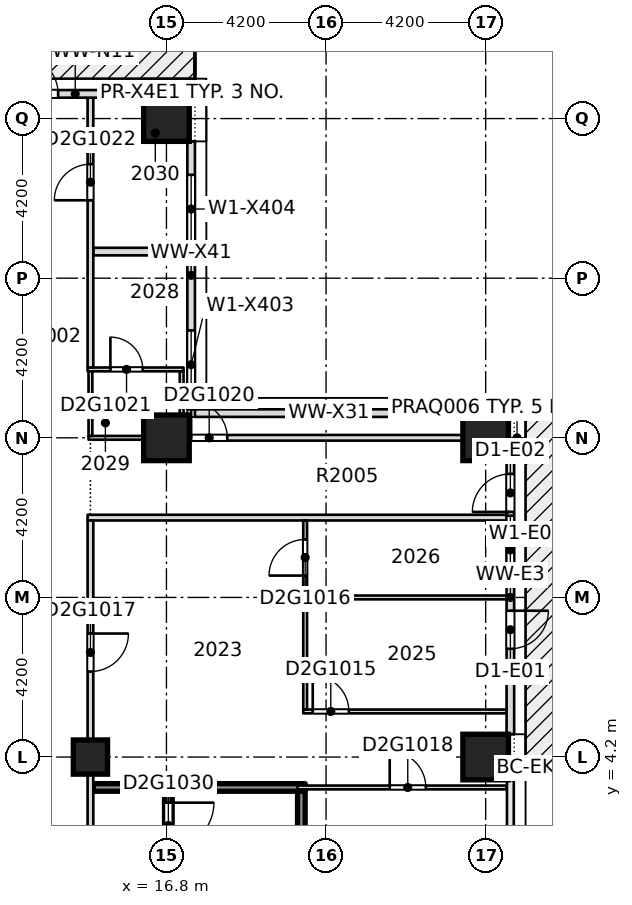
"""IFC4 building model, lengths in metres.
Left out: names, types, materials, properties, quantities, classifications, styles, units other than length and angle.
Written with IfcOpenShell. Run it as: python <this file> out.ifc"""

import sys

from ifc_helpers import new_model, si_unit, direction, frame, frame_2d, origin, origin_2d, place, context, subcontext, project, spatial, rectangle, extrude, element, fill, save


model = new_model("IFC4")
c1 = context("Model", 3, precision=1e-05, world=origin(), true_north=direction((0.0, 1.0)))
c2 = subcontext(c1, "Body", "Model", "MODEL_VIEW")
j1 = project(units=[si_unit("LENGTHUNIT", "METRE"), si_unit("PLANEANGLEUNIT", "RADIAN")], contexts=[c1])
p1 = place(None, origin())
s1 = spatial("IfcSite", under=j1, at=p1, CompositionType="ELEMENT")
p2 = place(p1, origin())
s2 = spatial("IfcBuilding", under=s1, at=p2, CompositionType="ELEMENT")
p3 = place(p2, frame((0.0, 0.0, 83.85)))
s3 = spatial("IfcBuildingStorey", under=s2, at=p3, CompositionType="ELEMENT", Elevation=83.85)
for number, where, z_axis, x_axis in (
    (1, (25.2, 4.2, -0.32), (0.0, 0.0, 1.0), (1.0, 0.0, 0.0)),
    (2, (16.8, 12.6, -0.32), (0.0, 0.0, 1.0), (1.0, 0.0, 0.0)),
    (3, (25.2, 12.6, -0.32), (0.0, 0.0, 1.0), (1.0, 0.0, 0.0)),
    (4, (16.8, 21.0, -0.32), (0.0, 0.0, 1.0), (1.0, 0.0, 0.0)),
):
    element("IfcColumn", number, at=place(p3, frame(where, z_axis=z_axis, x_axis=x_axis)), inside=s3, PredefinedType="COLUMN", context=c2, shape_type="SweptSolid", body=[
        extrude(rectangle(XDim=1.2, YDim=1.2, at=origin_2d()), origin(), (0.0, 0.0, 1.0), 3.45),
    ])
p4 = place(p3, frame((14.8, 4.2, -0.32), z_axis=(0.0, 0.0, 1.0), x_axis=(1.0, 0.0, 0.0)))
e5 = element("IfcColumn", 5, at=p4, inside=s3, PredefinedType="COLUMN", context=c2, shape_type="SweptSolid", body=[
    extrude(rectangle(XDim=0.9, YDim=0.9, at=origin_2d()), origin(), (0.0, 0.0, 1.0), 3.45),
])
p5 = place(p3, frame((14.875, 3.4, 0.0), z_axis=(0.0, 0.0, 1.0), x_axis=(1.0, 0.0, 0.0)))
e6 = element("IfcWall", 6, at=p5, inside=s3, PredefinedType="SOLIDWALL", context=c2, shape_type="SweptSolid", body=[
    extrude(rectangle(XDim=5.575, YDim=0.2, at=frame_2d((2.788, 0.0))), origin(), (0.0, 0.0, 1.0), 3.13),
])
p6 = place(p3, frame((20.25, 3.4, 0.0), z_axis=(0.0, 0.0, 1.0), x_axis=(1.0, 0.0, 0.0)))
e7 = element("IfcWall", 7, at=p6, inside=s3, PredefinedType="PARTITIONING", context=c2, shape_type="SweptSolid", body=[
    extrude(rectangle(XDim=5.5, YDim=0.1, at=frame_2d((2.75, 0.0))), origin(), (0.0, 0.0, 1.0), 3.13),
])
p7 = place(p6, frame((2.425, 0.0, 0.0)))
e8 = element("IfcOpeningElement", 8, at=p7, cuts=e7, PredefinedType="OPENING", context=c2, shape_type="SweptSolid", body=[
    extrude(rectangle(XDim=0.95, YDim=2.1, at=frame_2d((0.475, 1.05))), frame((0.0, 0.06, 0.0), z_axis=(0.0, -1.0, 0.0), x_axis=(1.0, 0.0, 0.0)), (0.0, 0.0, 1.0), 0.12),
])
p8 = place(p3, frame((20.4, 5.4, 0.0), z_axis=(0.0, 0.0, 1.0), x_axis=(1.0, 0.0, 0.0)))
e9 = element("IfcWall", 9, at=p8, inside=s3, PredefinedType="PARTITIONING", context=c2, shape_type="SweptSolid", body=[
    extrude(rectangle(XDim=5.35, YDim=0.1, at=frame_2d((2.675, 0.0))), origin(), (0.0, 0.0, 1.0), 3.13),
])
p9 = place(p8, frame((0.25, 0.0, 0.0)))
e10 = element("IfcOpeningElement", 10, at=p9, cuts=e9, PredefinedType="OPENING", context=c2, shape_type="SweptSolid", body=[
    extrude(rectangle(XDim=0.95, YDim=2.1, at=frame_2d((0.475, 1.05))), frame((0.0, 0.06, 0.0), z_axis=(0.0, -1.0, 0.0), x_axis=(1.0, 0.0, 0.0)), (0.0, 0.0, 1.0), 0.12),
])
p10 = place(p3, frame((20.5, 8.4, 0.0), z_axis=(0.0, 0.0, 1.0), x_axis=(1.0, 0.0, 0.0)))
e11 = element("IfcWall", 11, at=p10, inside=s3, PredefinedType="PARTITIONING", context=c2, shape_type="SweptSolid", body=[
    extrude(rectangle(XDim=5.25, YDim=0.1, at=frame_2d((2.625, 0.0))), origin(), (0.0, 0.0, 1.0), 3.13),
])
p11 = place(p3, frame((14.725, 10.5, 0.0), z_axis=(0.0, 0.0, 1.0), x_axis=(1.0, 0.0, 0.0)))
e12 = element("IfcWall", 12, at=p11, inside=s3, PredefinedType="PARTITIONING", context=c2, shape_type="SweptSolid", body=[
    extrude(rectangle(XDim=11.025, YDim=0.15, at=frame_2d((5.512, 0.0))), origin(), (0.0, 0.0, 1.0), 3.13),
])
p12 = place(p3, frame((14.75, 12.6, 0.0), z_axis=(0.0, 0.0, 1.0), x_axis=(1.0, 0.0, 0.0)))
e13 = element("IfcWall", 13, at=p12, inside=s3, PredefinedType="PARTITIONING", context=c2, shape_type="SweptSolid", body=[
    extrude(rectangle(XDim=2.5, YDim=0.1, at=frame_2d((1.25, 0.0))), origin(), (0.0, 0.0, 1.0), 3.13),
])
p13 = place(p3, frame((17.15, 12.6, 0.0), z_axis=(0.0, 0.0, 1.0), x_axis=(1.0, 0.0, 0.0)))
e14 = element("IfcWall", 14, at=p13, inside=s3, PredefinedType="PARTITIONING", context=c2, shape_type="SweptSolid", body=[
    extrude(rectangle(XDim=0.25, YDim=0.15, at=frame_2d((0.125, 0.0))), origin(), (0.0, 0.0, 1.0), 3.13),
])
p14 = place(p3, frame((14.725, 14.4, 0.0), z_axis=(0.0, 0.0, 1.0), x_axis=(1.0, 0.0, 0.0)))
e15 = element("IfcWall", 15, at=p14, inside=s3, PredefinedType="PARTITIONING", context=c2, shape_type="SweptSolid", body=[
    extrude(rectangle(XDim=2.525, YDim=0.1, at=frame_2d((1.262, 0.0))), origin(), (0.0, 0.0, 1.0), 3.13),
])
p15 = place(p14, frame((0.6, 0.0, 0.0)))
e16 = element("IfcOpeningElement", 16, at=p15, cuts=e15, PredefinedType="OPENING", context=c2, shape_type="SweptSolid", body=[
    extrude(rectangle(XDim=0.85, YDim=2.1, at=frame_2d((0.425, 1.05))), frame((0.0, 0.06, 0.0), z_axis=(0.0, -1.0, 0.0), x_axis=(1.0, 0.0, 0.0)), (0.0, 0.0, 1.0), 0.12),
])
p16 = place(p3, frame((14.875, 17.5, 0.0), z_axis=(0.0, 0.0, 1.0), x_axis=(1.0, 0.0, 0.0)))
e17 = element("IfcWall", 17, at=p16, inside=s3, PredefinedType="PARTITIONING", context=c2, shape_type="SweptSolid", body=[
    extrude(rectangle(XDim=2.475, YDim=0.2, at=frame_2d((1.238, 0.0))), origin(), (0.0, 0.0, 1.0), 3.13),
])
p17 = place(p3, frame((14.8, -10.45, 0.0), z_axis=(0.0, 0.0, 1.0), x_axis=(0.0, 1.0, 0.0)))
e18 = element("IfcWall", 18, at=p17, inside=s3, PredefinedType="PARTITIONING", context=c2, shape_type="SweptSolid", body=[
    extrude(rectangle(XDim=20.875, YDim=0.15, at=frame_2d((10.438, 0.0))), origin(), (0.0, 0.0, 1.0), 3.13),
])
p18 = place(p17, frame((0.9, 0.0, 0.0)))
e19 = element("IfcOpeningElement", 19, at=p18, cuts=e18, PredefinedType="OPENING", context=c2, shape_type="SweptSolid", body=[
    extrude(rectangle(XDim=0.95, YDim=2.1, at=frame_2d((0.475, 1.05))), frame((0.0, 0.085, 0.0), z_axis=(0.0, -1.0, 0.0), x_axis=(1.0, 0.0, 0.0)), (0.0, 0.0, 1.0), 0.17),
])
p19 = place(p17, frame((16.9, 0.0, 0.0)))
e20 = element("IfcOpeningElement", 20, at=p19, cuts=e18, PredefinedType="OPENING", context=c2, shape_type="SweptSolid", body=[
    extrude(rectangle(XDim=1.0, YDim=2.1, at=frame_2d((0.5, 1.05))), frame((0.0, 0.085, 0.0), z_axis=(0.0, -1.0, 0.0), x_axis=(1.0, 0.0, 0.0)), (0.0, 0.0, 1.0), 0.17),
])
p20 = place(p17, frame((9.9, 0.0, 0.0)))
e21 = element("IfcOpeningElement", 21, at=p20, cuts=e18, PredefinedType="OPENING", context=c2, shape_type="SweptSolid", body=[
    extrude(rectangle(XDim=1.1, YDim=2.1, at=frame_2d((0.55, 1.05))), frame((0.0, 0.085, 0.0), z_axis=(0.0, -1.0, 0.0), x_axis=(1.0, 0.0, 0.0)), (0.0, 0.0, 1.0), 0.17),
])
p21 = place(p17, frame((4.7, 0.0, 0.0)))
e22 = element("IfcOpeningElement", 22, at=p21, cuts=e18, PredefinedType="OPENING", context=c2, shape_type="SweptSolid", body=[
    extrude(rectangle(XDim=1.0, YDim=2.1, at=frame_2d((0.5, 1.05))), frame((0.0, 0.085, 0.0), z_axis=(0.0, -1.0, 0.0), x_axis=(1.0, 0.0, 0.0)), (0.0, 0.0, 1.0), 0.17),
])
p22 = place(p3, frame((14.8, 12.65, 0.0), z_axis=(0.0, 0.0, 1.0), x_axis=(0.0, 1.0, 0.0)))
e23 = element("IfcWall", 23, at=p22, inside=s3, PredefinedType="PARTITIONING", context=c2, shape_type="SweptSolid", body=[
    extrude(rectangle(XDim=1.7, YDim=0.1, at=frame_2d((0.85, 0.0))), origin(), (0.0, 0.0, 1.0), 3.13),
])
p23 = place(p3, frame((14.8, 14.45, 0.0), z_axis=(0.0, 0.0, 1.0), x_axis=(0.0, 1.0, 0.0)))
e24 = element("IfcWall", 24, at=p23, inside=s3, PredefinedType="PARTITIONING", context=c2, shape_type="SweptSolid", body=[
    extrude(rectangle(XDim=7.1, YDim=0.15, at=frame_2d((3.55, 0.0))), origin(), (0.0, 0.0, 1.0), 3.13),
])
p24 = place(p23, frame((4.4, 0.0, 0.0)))
e25 = element("IfcOpeningElement", 25, at=p24, cuts=e24, PredefinedType="OPENING", context=c2, shape_type="SweptSolid", body=[
    extrude(rectangle(XDim=0.95, YDim=2.1, at=frame_2d((0.475, 1.05))), frame((0.0, 0.085, 0.0), z_axis=(0.0, -1.0, 0.0), x_axis=(1.0, 0.0, 0.0)), (0.0, 0.0, 1.0), 0.17),
])
p25 = place(p3, frame((16.85, -3.3, 0.0), z_axis=(0.0, 0.0, 1.0), x_axis=(0.0, 1.0, 0.0)))
e26 = element("IfcWall", 26, at=p25, inside=s3, PredefinedType="SOLIDWALL", context=c2, shape_type="SweptSolid", body=[
    extrude(rectangle(XDim=6.6, YDim=0.2, at=frame_2d((3.3, 0.0))), origin(), (0.0, 0.0, 1.0), 3.13),
])
p26 = place(p25, frame((5.1, 0.0, 0.0)))
e27 = element("IfcOpeningElement", 27, at=p26, cuts=e26, PredefinedType="OPENING", context=c2, shape_type="SweptSolid", body=[
    extrude(rectangle(XDim=1.2, YDim=2.1, at=frame_2d((0.6, 1.05))), frame((0.0, 0.11, 0.0), z_axis=(0.0, -1.0, 0.0), x_axis=(1.0, 0.0, 0.0)), (0.0, 0.0, 1.0), 0.22),
])
p27 = place(p3, frame((17.2, 12.675, 0.0), z_axis=(0.0, 0.0, 1.0), x_axis=(0.0, 1.0, 0.0)))
e28 = element("IfcWall", 28, at=p27, inside=s3, PredefinedType="PARTITIONING", context=c2, shape_type="SweptSolid", body=[
    extrude(rectangle(XDim=1.675, YDim=0.1, at=frame_2d((0.837, 0.0))), origin(), (0.0, 0.0, 1.0), 3.13),
])
p28 = place(p3, frame((20.35, -0.83, 0.0), z_axis=(0.0, 0.0, 1.0), x_axis=(0.0, 1.0, 0.0)))
e29 = element("IfcWall", 29, at=p28, inside=s3, PredefinedType="SOLIDWALL", context=c2, shape_type="SweptSolid", body=[
    extrude(rectangle(XDim=4.13, YDim=0.2, at=frame_2d((2.065, 0.0))), origin(), (0.0, 0.0, 1.0), 3.13),
])
p29 = place(p3, frame((20.45, 5.45, 0.0), z_axis=(0.0, 0.0, 1.0), x_axis=(0.0, 1.0, 0.0)))
e30 = element("IfcWall", 30, at=p29, inside=s3, PredefinedType="PARTITIONING", context=c2, shape_type="SweptSolid", body=[
    extrude(rectangle(XDim=4.975, YDim=0.1, at=frame_2d((2.488, 0.0))), origin(), (0.0, 0.0, 1.0), 3.13),
])
p30 = place(p29, frame((3.525, 0.0, 0.0)))
e31 = element("IfcOpeningElement", 31, at=p30, cuts=e30, PredefinedType="OPENING", context=c2, shape_type="SweptSolid", body=[
    extrude(rectangle(XDim=0.95, YDim=2.1, at=frame_2d((0.475, 1.05))), frame((0.0, 0.06, 0.0), z_axis=(0.0, -1.0, 0.0), x_axis=(1.0, 0.0, 0.0)), (0.0, 0.0, 1.0), 0.12),
])
p31 = place(p3, frame((25.85, 4.8, 0.0), z_axis=(0.0, 0.0, 1.0), x_axis=(0.0, 1.0, 0.0)))
e32 = element("IfcWall", 32, at=p31, inside=s3, PredefinedType="STANDARD", context=c2, shape_type="SweptSolid", body=[
    extrude(rectangle(XDim=7.2, YDim=0.2, at=frame_2d((3.6, 0.0))), origin(), (0.0, 0.0, 1.0), 3.13),
])
p32 = place(p31, frame((2.25, 0.0, 0.0)))
e33 = element("IfcOpeningElement", 33, at=p32, cuts=e32, PredefinedType="OPENING", context=c2, shape_type="SweptSolid", body=[
    extrude(rectangle(XDim=1.0, YDim=2.4, at=frame_2d((0.5, 1.2))), frame((0.0, 0.11, 0.0), z_axis=(0.0, -1.0, 0.0), x_axis=(1.0, 0.0, 0.0)), (0.0, 0.0, 1.0), 0.22),
])
p33 = place(p31, frame((3.95, 0.0, 0.2)))
e34 = element("IfcOpeningElement", 34, at=p33, cuts=e32, PredefinedType="OPENING", context=c2, shape_type="SweptSolid", body=[
    extrude(rectangle(XDim=1.8, YDim=2.65, at=frame_2d((0.9, 1.325))), frame((0.0, 0.11, 0.0), z_axis=(0.0, -1.0, 0.0), x_axis=(1.0, 0.0, 0.0)), (0.0, 0.0, 1.0), 0.22),
])
p34 = place(p31, frame((5.85, 0.0, 0.0)))
e35 = element("IfcOpeningElement", 35, at=p34, cuts=e32, PredefinedType="OPENING", context=c2, shape_type="SweptSolid", body=[
    extrude(rectangle(XDim=1.0, YDim=2.4, at=frame_2d((0.5, 1.2))), frame((0.0, 0.11, 0.0), z_axis=(0.0, -1.0, 0.0), x_axis=(1.0, 0.0, 0.0)), (0.0, 0.0, 1.0), 0.22),
])
p35 = place(p3, frame((24.6, 13.25, 0.0), z_axis=(0.0, 0.0, 1.0), x_axis=(-1.0, 0.0, 0.0)))
e36 = element("IfcWall", 36, at=p35, inside=s3, PredefinedType="STANDARD", context=c2, shape_type="SweptSolid", body=[
    extrude(rectangle(XDim=7.05, YDim=0.2, at=frame_2d((3.525, 0.0))), origin(), (0.0, 0.0, 1.0), 3.13),
])
p36 = place(p3, frame((17.45, 13.35, 0.0), z_axis=(0.0, 0.0, 1.0), x_axis=(0.0, 1.0, 0.0)))
e37 = element("IfcWall", 37, at=p36, inside=s3, PredefinedType="STANDARD", context=c2, shape_type="SweptSolid", body=[
    extrude(rectangle(XDim=7.05, YDim=0.2, at=frame_2d((3.525, 0.0))), origin(), (0.0, 0.0, 1.0), 3.13),
])
p37 = place(p36, frame((0.275, 0.0, 0.2)))
e38 = element("IfcOpeningElement", 38, at=p37, cuts=e37, PredefinedType="OPENING", context=c2, shape_type="SweptSolid", body=[
    extrude(rectangle(XDim=1.8, YDim=2.65, at=frame_2d((0.9, 1.325))), frame((0.0, 0.11, 0.0), z_axis=(0.0, -1.0, 0.0), x_axis=(1.0, 0.0, 0.0)), (0.0, 0.0, 1.0), 0.22),
])
p38 = place(p36, frame((4.37, 0.0, 0.2)))
e39 = element("IfcOpeningElement", 39, at=p38, cuts=e37, PredefinedType="OPENING", context=c2, shape_type="SweptSolid", body=[
    extrude(rectangle(XDim=1.8, YDim=2.65, at=frame_2d((0.9, 1.325))), frame((0.0, 0.11, 0.0), z_axis=(0.0, -1.0, 0.0), x_axis=(1.0, 0.0, 0.0)), (0.0, 0.0, 1.0), 0.22),
])
p39 = place(p3, frame((16.2, 21.65, 0.0), z_axis=(0.0, 0.0, 1.0), x_axis=(-1.0, 0.0, 0.0)))
e40 = element("IfcWall", 40, at=p39, inside=s3, PredefinedType="STANDARD", context=c2, shape_type="SweptSolid", body=[
    extrude(rectangle(XDim=3.6, YDim=0.2, at=frame_2d((1.8, 0.0))), origin(), (0.0, 0.0, 1.0), 3.13),
])
p40 = place(p39, frame((2.25, 0.0, 0.0)))
e41 = element("IfcOpeningElement", 41, at=p40, cuts=e40, PredefinedType="OPENING", context=c2, shape_type="SweptSolid", body=[
    extrude(rectangle(XDim=1.0, YDim=2.4, at=frame_2d((0.5, 1.2))), frame((0.0, 0.11, 0.0), z_axis=(0.0, -1.0, 0.0), x_axis=(1.0, 0.0, 0.0)), (0.0, 0.0, 1.0), 0.22),
])
p41 = place(p3, frame((17.4, 12.6, 0.0), z_axis=(0.0, 0.0, 1.0), x_axis=(1.0, 0.0, 0.0)))
e42 = element("IfcWall", 42, at=p41, inside=s3, PredefinedType="PARTITIONING", context=c2, shape_type="SweptSolid", body=[
    extrude(rectangle(XDim=7.2, YDim=0.15, at=frame_2d((3.6, 0.0))), origin(), (0.0, 0.0, 1.0), 2.58),
])
p42 = place(p41, frame((0.05, 0.0, 0.0)))
e43 = element("IfcOpeningElement", 43, at=p42, cuts=e42, PredefinedType="OPENING", context=c2, shape_type="SweptSolid", body=[
    extrude(rectangle(XDim=0.95, YDim=2.1, at=frame_2d((0.475, 1.05))), frame((0.0, 0.085, 0.0), z_axis=(0.0, -1.0, 0.0), x_axis=(1.0, 0.0, 0.0)), (0.0, 0.0, 1.0), 0.17),
])
p43 = place(p3, frame((24.6, 12.6, 0.0), z_axis=(0.0, 0.0, 1.0), x_axis=(1.0, 0.0, 0.0)))
e44 = element("IfcWall", 44, at=p43, inside=s3, PredefinedType="PARTITIONING", context=c2, shape_type="SweptSolid", body=[
    extrude(rectangle(XDim=1.15, YDim=0.15, at=frame_2d((0.575, 0.0))), origin(), (0.0, 0.0, 1.0), 3.13),
])
p44 = place(p9, origin())
e45 = element("IfcDoor", 45, at=p44, inside=s3, OperationType="SINGLE_SWING_LEFT", PredefinedType="DOOR", context=c2, shape_type="SweptSolid", body=[
    extrude(rectangle(XDim=0.95, YDim=2.1, at=frame_2d((0.475, 1.05))), frame((0.0, 0.025, 0.0), z_axis=(0.0, -1.0, 0.0), x_axis=(1.0, 0.0, 0.0)), (0.0, 0.0, 1.0), 0.05),
])
fill(e10, e45)
p45 = place(p30, origin())
e46 = element("IfcDoor", 46, at=p45, inside=s3, OperationType="SINGLE_SWING_RIGHT", PredefinedType="DOOR", context=c2, shape_type="SweptSolid", body=[
    extrude(rectangle(XDim=0.95, YDim=2.1, at=frame_2d((0.475, 1.05))), frame((0.0, 0.025, 0.0), z_axis=(0.0, -1.0, 0.0), x_axis=(1.0, 0.0, 0.0)), (0.0, 0.0, 1.0), 0.05),
])
fill(e31, e46)
p46 = place(p19, origin())
e47 = element("IfcDoor", 47, at=p46, inside=s3, OperationType="SINGLE_SWING_RIGHT", PredefinedType="DOOR", context=c2, shape_type="SweptSolid", body=[
    extrude(rectangle(XDim=1.0, YDim=2.1, at=frame_2d((0.5, 1.05))), frame((0.0, 0.025, 0.0), z_axis=(0.0, -1.0, 0.0), x_axis=(1.0, 0.0, 0.0)), (0.0, 0.0, 1.0), 0.05),
])
fill(e20, e47)
p47 = place(p7, origin())
e48 = element("IfcDoor", 48, at=p47, inside=s3, OperationType="SINGLE_SWING_LEFT", PredefinedType="DOOR", context=c2, shape_type="SweptSolid", body=[
    extrude(rectangle(XDim=0.95, YDim=2.1, at=frame_2d((0.475, 1.05))), frame((0.0, 0.025, 0.0), z_axis=(0.0, -1.0, 0.0), x_axis=(1.0, 0.0, 0.0)), (0.0, 0.0, 1.0), 0.05),
])
fill(e8, e48)
p48 = place(p42, origin())
e49 = element("IfcDoor", 49, at=p48, inside=s3, OperationType="SINGLE_SWING_LEFT", PredefinedType="DOOR", context=c2, shape_type="SweptSolid", body=[
    extrude(rectangle(XDim=0.95, YDim=2.1, at=frame_2d((0.475, 1.05))), frame((0.0, 0.025, 0.0), z_axis=(0.0, -1.0, 0.0), x_axis=(1.0, 0.0, 0.0)), (0.0, 0.0, 1.0), 0.05),
])
fill(e43, e49)
p49 = place(p15, origin())
e50 = element("IfcDoor", 50, at=p49, inside=s3, OperationType="SINGLE_SWING_RIGHT", PredefinedType="DOOR", context=c2, shape_type="SweptSolid", body=[
    extrude(rectangle(XDim=0.85, YDim=2.1, at=frame_2d((0.425, 1.05))), frame((0.0, 0.025, 0.0), z_axis=(0.0, -1.0, 0.0), x_axis=(1.0, 0.0, 0.0)), (0.0, 0.0, 1.0), 0.05),
])
fill(e16, e50)
p50 = place(p24, origin())
e51 = element("IfcDoor", 51, at=p50, inside=s3, OperationType="SINGLE_SWING_RIGHT", PredefinedType="DOOR", context=c2, shape_type="SweptSolid", body=[
    extrude(rectangle(XDim=0.95, YDim=2.1, at=frame_2d((0.475, 1.05))), frame((0.0, 0.025, 0.0), z_axis=(0.0, -1.0, 0.0), x_axis=(1.0, 0.0, 0.0)), (0.0, 0.0, 1.0), 0.05),
])
fill(e25, e51)
p51 = place(p26, origin())
e52 = element("IfcDoor", 52, at=p51, inside=s3, OperationType="SINGLE_SWING_LEFT", PredefinedType="DOOR", context=c2, shape_type="SweptSolid", body=[
    extrude(rectangle(XDim=1.2, YDim=2.1, at=frame_2d((0.6, 1.05))), frame((0.0, 0.025, 0.0), z_axis=(0.0, -1.0, 0.0), x_axis=(1.0, 0.0, 0.0)), (0.0, 0.0, 1.0), 0.05),
])
fill(e27, e52)
p52 = place(p32, origin())
e53 = element("IfcDoor", 53, at=p52, inside=s3, OperationType="SINGLE_SWING_LEFT", PredefinedType="DOOR", context=c2, shape_type="SweptSolid", body=[
    extrude(rectangle(XDim=1.0, YDim=2.4, at=frame_2d((0.5, 1.2))), frame((0.0, 0.025, 0.0), z_axis=(0.0, -1.0, 0.0), x_axis=(1.0, 0.0, 0.0)), (0.0, 0.0, 1.0), 0.05),
])
fill(e33, e53)
p53 = place(p33, origin())
e54 = element("IfcWindow", 54, at=p53, inside=s3, PartitioningType="SINGLE_PANEL", PredefinedType="WINDOW", context=c2, shape_type="SweptSolid", body=[
    extrude(rectangle(XDim=1.8, YDim=2.65, at=frame_2d((0.9, 1.325))), frame((0.0, 0.03, 0.0), z_axis=(0.0, -1.0, 0.0), x_axis=(1.0, 0.0, 0.0)), (0.0, 0.0, 1.0), 0.06),
])
fill(e34, e54)
p54 = place(p34, origin())
e55 = element("IfcDoor", 55, at=p54, inside=s3, OperationType="SINGLE_SWING_LEFT", PredefinedType="DOOR", context=c2, shape_type="SweptSolid", body=[
    extrude(rectangle(XDim=1.0, YDim=2.4, at=frame_2d((0.5, 1.2))), frame((0.0, 0.025, 0.0), z_axis=(0.0, -1.0, 0.0), x_axis=(1.0, 0.0, 0.0)), (0.0, 0.0, 1.0), 0.05),
])
fill(e35, e55)
p55 = place(p37, origin())
e56 = element("IfcWindow", 56, at=p55, inside=s3, PartitioningType="SINGLE_PANEL", PredefinedType="WINDOW", context=c2, shape_type="SweptSolid", body=[
    extrude(rectangle(XDim=1.8, YDim=2.65, at=frame_2d((0.9, 1.325))), frame((0.0, 0.03, 0.0), z_axis=(0.0, -1.0, 0.0), x_axis=(1.0, 0.0, 0.0)), (0.0, 0.0, 1.0), 0.06),
])
fill(e38, e56)
p56 = place(p38, origin())
e57 = element("IfcWindow", 57, at=p56, inside=s3, PartitioningType="SINGLE_PANEL", PredefinedType="WINDOW", context=c2, shape_type="SweptSolid", body=[
    extrude(rectangle(XDim=1.8, YDim=2.65, at=frame_2d((0.9, 1.325))), frame((0.0, 0.03, 0.0), z_axis=(0.0, -1.0, 0.0), x_axis=(1.0, 0.0, 0.0)), (0.0, 0.0, 1.0), 0.06),
])
fill(e39, e57)
p57 = place(p40, origin())
e58 = element("IfcDoor", 58, at=p57, inside=s3, OperationType="SINGLE_SWING_LEFT", PredefinedType="DOOR", context=c2, shape_type="SweptSolid", body=[
    extrude(rectangle(XDim=1.0, YDim=2.4, at=frame_2d((0.5, 1.2))), frame((0.0, 0.025, 0.0), z_axis=(0.0, -1.0, 0.0), x_axis=(1.0, 0.0, 0.0)), (0.0, 0.0, 1.0), 0.05),
])
fill(e41, e58)
save(model, sys.argv[1])
